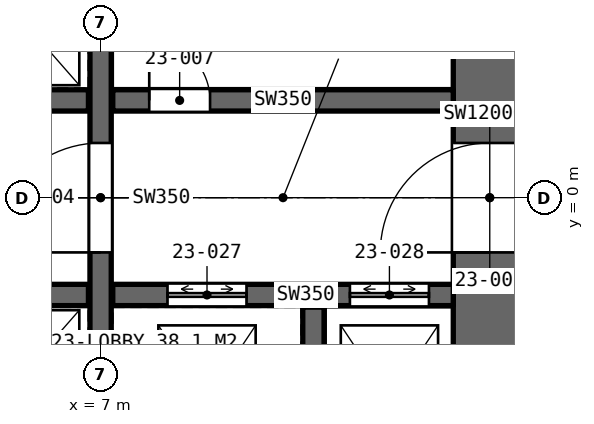
"""IFC4 building model, lengths in metres.
Left out: names, types, materials, properties, quantities, classifications, styles, units other than length and angle.
Written with IfcOpenShell. Run it as: python <this file> out.ifc"""

import sys

from ifc_helpers import new_model, si_unit, direction, frame, frame_2d, origin, place, context, subcontext, project, spatial, rectangle, extrude, element, fill, save


model = new_model("IFC4")
c1 = context("Model", 3, precision=1e-05, world=origin(), true_north=direction((0.0, 1.0)))
c2 = subcontext(c1, "Body", "Model", "MODEL_VIEW")
j1 = project(units=[si_unit("LENGTHUNIT", "METRE"), si_unit("PLANEANGLEUNIT", "RADIAN")], contexts=[c1])
p1 = place(None, origin())
s1 = spatial("IfcSite", under=j1, at=p1, CompositionType="ELEMENT")
p2 = place(p1, origin())
s2 = spatial("IfcBuilding", under=s1, at=p2, CompositionType="ELEMENT")
p3 = place(p2, frame((0.0, 0.0, 113.4)))
s3 = spatial("IfcBuildingStorey", under=s2, at=p3, CompositionType="ELEMENT", Elevation=113.4)
p4 = place(p3, frame((13.4, -8.8, 0.0), z_axis=(0.0, 0.0, 1.0), x_axis=(0.0, 1.0, 0.0)))
e1 = element("IfcWall", 1, at=p4, inside=s3, PredefinedType="SHEAR", context=c2, shape_type="SweptSolid", body=[
    extrude(rectangle(XDim=17.6, YDim=1.2, at=frame_2d((8.8, 0.0))), origin(), (0.0, 0.0, 1.0), 4.2),
])
p5 = place(p4, frame((7.9, 0.0, 0.0)))
e2 = element("IfcOpeningElement", 2, at=p5, cuts=e1, PredefinedType="OPENING", context=c2, shape_type="SweptSolid", body=[
    extrude(rectangle(XDim=1.8, YDim=2.4, at=frame_2d((0.9, 1.2))), frame((0.0, 0.61, 0.0), z_axis=(0.0, -1.0, 0.0), x_axis=(1.0, 0.0, 0.0)), (0.0, 0.0, 1.0), 1.22),
])
p6 = place(p3, frame((7.0, -8.8, 0.0), z_axis=(0.0, 0.0, 1.0), x_axis=(0.0, 1.0, 0.0)))
e3 = element("IfcWall", 3, at=p6, inside=s3, PredefinedType="SHEAR", context=c2, shape_type="SweptSolid", body=[
    extrude(rectangle(XDim=17.6, YDim=0.35, at=frame_2d((8.8, 0.0))), origin(), (0.0, 0.0, 1.0), 4.2),
])
p7 = place(p6, frame((7.9, 0.0, 0.0)))
e4 = element("IfcOpeningElement", 4, at=p7, cuts=e3, PredefinedType="OPENING", context=c2, shape_type="SweptSolid", body=[
    extrude(rectangle(XDim=1.8, YDim=2.4, at=frame_2d((0.9, 1.2))), frame((0.0, 0.185, 0.0), z_axis=(0.0, -1.0, 0.0), x_axis=(1.0, 0.0, 0.0)), (0.0, 0.0, 1.0), 0.37),
])
p8 = place(p3, frame((-6.8, 1.6, 0.0), z_axis=(0.0, 0.0, 1.0), x_axis=(1.0, 0.0, 0.0)))
e5 = element("IfcWall", 5, at=p8, inside=s3, PredefinedType="SHEAR", context=c2, shape_type="SweptSolid", body=[
    extrude(rectangle(XDim=13.6, YDim=0.35, at=frame_2d((6.8, 0.0))), origin(), (0.0, 0.0, 1.0), 4.2),
])
p9 = place(p8, frame((0.365, 0.0, 0.0)))
e6 = element("IfcOpeningElement", 6, at=p9, cuts=e5, PredefinedType="OPENING", context=c2, shape_type="SweptSolid", body=[
    extrude(rectangle(XDim=1.0, YDim=2.4, at=frame_2d((0.5, 1.2))), frame((0.0, 0.185, 0.0), z_axis=(0.0, -1.0, 0.0), x_axis=(1.0, 0.0, 0.0)), (0.0, 0.0, 1.0), 0.37),
])
p10 = place(p8, frame((3.2, 0.0, 0.0)))
e7 = element("IfcOpeningElement", 7, at=p10, cuts=e5, PredefinedType="OPENING", context=c2, shape_type="SweptSolid", body=[
    extrude(rectangle(XDim=1.0, YDim=2.4, at=frame_2d((0.5, 1.2))), frame((0.0, 0.185, 0.0), z_axis=(0.0, -1.0, 0.0), x_axis=(1.0, 0.0, 0.0)), (0.0, 0.0, 1.0), 0.37),
])
p11 = place(p8, frame((6.95, 0.0, 0.0)))
e8 = element("IfcOpeningElement", 8, at=p11, cuts=e5, PredefinedType="OPENING", context=c2, shape_type="SweptSolid", body=[
    extrude(rectangle(XDim=0.9, YDim=2.4, at=frame_2d((0.45, 1.2))), frame((0.0, 0.185, 0.0), z_axis=(0.0, -1.0, 0.0), x_axis=(1.0, 0.0, 0.0)), (0.0, 0.0, 1.0), 0.37),
])
p12 = place(p8, frame((9.535, 0.0, 0.0)))
e9 = element("IfcOpeningElement", 9, at=p12, cuts=e5, PredefinedType="OPENING", context=c2, shape_type="SweptSolid", body=[
    extrude(rectangle(XDim=1.0, YDim=2.4, at=frame_2d((0.5, 1.2))), frame((0.0, 0.185, 0.0), z_axis=(0.0, -1.0, 0.0), x_axis=(1.0, 0.0, 0.0)), (0.0, 0.0, 1.0), 0.37),
])
p13 = place(p3, frame((-6.8, -1.6, 0.0), z_axis=(0.0, 0.0, 1.0), x_axis=(1.0, 0.0, 0.0)))
e10 = element("IfcWall", 10, at=p13, inside=s3, PredefinedType="SHEAR", context=c2, shape_type="SweptSolid", body=[
    extrude(rectangle(XDim=13.6, YDim=0.35, at=frame_2d((6.8, 0.0))), origin(), (0.0, 0.0, 1.0), 4.2),
])
p14 = place(p13, frame((0.7, 0.0, 0.0)))
e11 = element("IfcOpeningElement", 11, at=p14, cuts=e10, PredefinedType="OPENING", context=c2, shape_type="SweptSolid", body=[
    extrude(rectangle(XDim=1.1, YDim=2.4, at=frame_2d((0.55, 1.2))), frame((0.0, 0.185, 0.0), z_axis=(0.0, -1.0, 0.0), x_axis=(1.0, 0.0, 0.0)), (0.0, 0.0, 1.0), 0.37),
])
p15 = place(p13, frame((3.5, 0.0, 0.0)))
e12 = element("IfcOpeningElement", 12, at=p15, cuts=e10, PredefinedType="OPENING", context=c2, shape_type="SweptSolid", body=[
    extrude(rectangle(XDim=1.1, YDim=2.4, at=frame_2d((0.55, 1.2))), frame((0.0, 0.185, 0.0), z_axis=(0.0, -1.0, 0.0), x_axis=(1.0, 0.0, 0.0)), (0.0, 0.0, 1.0), 0.37),
])
p16 = place(p13, frame((6.3, 0.0, 0.0)))
e13 = element("IfcOpeningElement", 13, at=p16, cuts=e10, PredefinedType="OPENING", context=c2, shape_type="SweptSolid", body=[
    extrude(rectangle(XDim=1.1, YDim=2.4, at=frame_2d((0.55, 1.2))), frame((0.0, 0.185, 0.0), z_axis=(0.0, -1.0, 0.0), x_axis=(1.0, 0.0, 0.0)), (0.0, 0.0, 1.0), 0.37),
])
p17 = place(p13, frame((9.1, 0.0, 0.0)))
e14 = element("IfcOpeningElement", 14, at=p17, cuts=e10, PredefinedType="OPENING", context=c2, shape_type="SweptSolid", body=[
    extrude(rectangle(XDim=1.1, YDim=2.4, at=frame_2d((0.55, 1.2))), frame((0.0, 0.185, 0.0), z_axis=(0.0, -1.0, 0.0), x_axis=(1.0, 0.0, 0.0)), (0.0, 0.0, 1.0), 0.37),
])
p18 = place(p3, frame((7.2, 1.6, 0.0), z_axis=(0.0, 0.0, 1.0), x_axis=(1.0, 0.0, 0.0)))
e15 = element("IfcWall", 15, at=p18, inside=s3, PredefinedType="SHEAR", context=c2, shape_type="SweptSolid", body=[
    extrude(rectangle(XDim=5.6, YDim=0.35, at=frame_2d((2.8, 0.0))), origin(), (0.0, 0.0, 1.0), 4.2),
])
p19 = place(p18, frame((0.6, 0.0, 0.0)))
e16 = element("IfcOpeningElement", 16, at=p19, cuts=e15, PredefinedType="OPENING", context=c2, shape_type="SweptSolid", body=[
    extrude(rectangle(XDim=1.0, YDim=2.4, at=frame_2d((0.5, 1.2))), frame((0.0, 0.185, 0.0), z_axis=(0.0, -1.0, 0.0), x_axis=(1.0, 0.0, 0.0)), (0.0, 0.0, 1.0), 0.37),
])
p20 = place(p3, frame((7.2, -1.6, 0.0), z_axis=(0.0, 0.0, 1.0), x_axis=(1.0, 0.0, 0.0)))
e17 = element("IfcWall", 17, at=p20, inside=s3, PredefinedType="SHEAR", context=c2, shape_type="SweptSolid", body=[
    extrude(rectangle(XDim=5.6, YDim=0.35, at=frame_2d((2.8, 0.0))), origin(), (0.0, 0.0, 1.0), 4.2),
])
p21 = place(p20, frame((0.9, 0.0, 0.0)))
e18 = element("IfcOpeningElement", 18, at=p21, cuts=e17, PredefinedType="OPENING", context=c2, shape_type="SweptSolid", body=[
    extrude(rectangle(XDim=1.3, YDim=2.4, at=frame_2d((0.65, 1.2))), frame((0.0, 0.185, 0.0), z_axis=(0.0, -1.0, 0.0), x_axis=(1.0, 0.0, 0.0)), (0.0, 0.0, 1.0), 0.37),
])
p22 = place(p20, frame((3.9, 0.0, 0.0)))
e19 = element("IfcOpeningElement", 19, at=p22, cuts=e17, PredefinedType="OPENING", context=c2, shape_type="SweptSolid", body=[
    extrude(rectangle(XDim=1.3, YDim=2.4, at=frame_2d((0.65, 1.2))), frame((0.0, 0.185, 0.0), z_axis=(0.0, -1.0, 0.0), x_axis=(1.0, 0.0, 0.0)), (0.0, 0.0, 1.0), 0.37),
])
p23 = place(p3, frame((10.5, -4.8, 0.0), z_axis=(0.0, 0.0, 1.0), x_axis=(0.0, 1.0, 0.0)))
e20 = element("IfcWall", 20, at=p23, inside=s3, PredefinedType="SHEAR", context=c2, shape_type="SweptSolid", body=[
    extrude(rectangle(XDim=3.0, YDim=0.35, at=frame_2d((1.5, 0.0))), origin(), (0.0, 0.0, 1.0), 4.2),
])
p24 = place(p5, origin())
e21 = element("IfcDoor", 21, at=p24, inside=s3, OperationType="DOUBLE_DOOR_SINGLE_SWING", PredefinedType="DOOR", context=c2, shape_type="SweptSolid", body=[
    extrude(rectangle(XDim=1.8, YDim=2.4, at=frame_2d((0.9, 1.2))), frame((0.0, 0.025, 0.0), z_axis=(0.0, -1.0, 0.0), x_axis=(1.0, 0.0, 0.0)), (0.0, 0.0, 1.0), 0.05),
])
fill(e2, e21)
p25 = place(p7, origin())
e22 = element("IfcDoor", 22, at=p25, inside=s3, OperationType="DOUBLE_DOOR_SINGLE_SWING", PredefinedType="DOOR", context=c2, shape_type="SweptSolid", body=[
    extrude(rectangle(XDim=1.8, YDim=2.4, at=frame_2d((0.9, 1.2))), frame((0.0, 0.025, 0.0), z_axis=(0.0, -1.0, 0.0), x_axis=(1.0, 0.0, 0.0)), (0.0, 0.0, 1.0), 0.05),
])
fill(e4, e22)
p26 = place(p19, origin())
e23 = element("IfcDoor", 23, at=p26, inside=s3, OperationType="SINGLE_SWING_LEFT", PredefinedType="DOOR", context=c2, shape_type="SweptSolid", body=[
    extrude(rectangle(XDim=1.0, YDim=2.4, at=frame_2d((0.5, 1.2))), frame((0.0, 0.025, 0.0), z_axis=(0.0, -1.0, 0.0), x_axis=(1.0, 0.0, 0.0)), (0.0, 0.0, 1.0), 0.05),
])
fill(e16, e23)
p27 = place(p21, origin())
e24 = element("IfcDoor", 24, at=p27, inside=s3, OperationType="DOUBLE_DOOR_SLIDING", PredefinedType="DOOR", context=c2, shape_type="SweptSolid", body=[
    extrude(rectangle(XDim=1.3, YDim=2.4, at=frame_2d((0.65, 1.2))), frame((0.0, 0.025, 0.0), z_axis=(0.0, -1.0, 0.0), x_axis=(1.0, 0.0, 0.0)), (0.0, 0.0, 1.0), 0.05),
])
fill(e18, e24)
p28 = place(p22, origin())
e25 = element("IfcDoor", 25, at=p28, inside=s3, OperationType="DOUBLE_DOOR_SLIDING", PredefinedType="DOOR", context=c2, shape_type="SweptSolid", body=[
    extrude(rectangle(XDim=1.3, YDim=2.4, at=frame_2d((0.65, 1.2))), frame((0.0, 0.025, 0.0), z_axis=(0.0, -1.0, 0.0), x_axis=(1.0, 0.0, 0.0)), (0.0, 0.0, 1.0), 0.05),
])
fill(e19, e25)
save(model, sys.argv[1])
